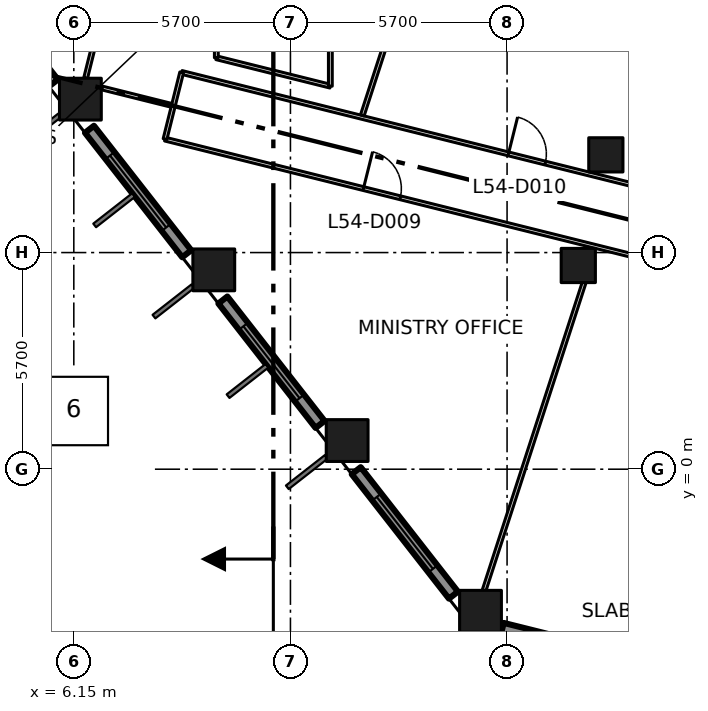
"""IFC4 building model, lengths in metres.
Left out: names, types, materials, properties, quantities, classifications, styles, units other than length and angle.
Written with IfcOpenShell. Run it as: python <this file> out.ifc"""

import sys

from ifc_helpers import new_model, si_unit, direction, frame, frame_2d, origin, origin_2d, place, context, subcontext, project, spatial, rectangle, extrude, element, fill, save


model = new_model("IFC4")
c1 = context("Model", 3, precision=1e-05, world=origin(), true_north=direction((0.0, 1.0)))
c2 = subcontext(c1, "Body", "Model", "MODEL_VIEW")
j1 = project(units=[si_unit("LENGTHUNIT", "METRE"), si_unit("PLANEANGLEUNIT", "RADIAN")], contexts=[c1])
p1 = place(None, origin())
s1 = spatial("IfcSite", under=j1, at=p1, CompositionType="ELEMENT")
p2 = place(p1, origin())
s2 = spatial("IfcBuilding", under=s1, at=p2, CompositionType="ELEMENT")
p3 = place(p2, frame((0.0, 0.0, 238.2)))
s3 = spatial("IfcBuildingStorey", under=s2, at=p3, CompositionType="ELEMENT", Elevation=238.2)
for number, where, z_axis, x_axis in (
    (1, (16.851, -3.738, 0.0), (0.0, 0.0, 1.0), (1.0, 0.0, 0.0)),
    (2, (13.342, 0.754, 0.0), (0.0, 0.0, 1.0), (1.0, 0.0, 0.0)),
    (3, (9.833, 5.245, 0.0), (0.0, 0.0, 1.0), (1.0, 0.0, 0.0)),
    (4, (6.323, 9.737, 0.0), (0.0, 0.0, 1.0), (1.0, 0.0, 0.0)),
):
    element("IfcColumn", number, at=place(p3, frame(where, z_axis=z_axis, x_axis=x_axis)), inside=s3, PredefinedType="COLUMN", context=c2, shape_type="SweptSolid", body=[
        extrude(rectangle(XDim=1.1, YDim=1.1, at=origin_2d()), origin(), (0.0, 0.0, 1.0), 4.2),
    ])
for number, where, z_axis, x_axis in (
    (5, (19.424, 5.36, 0.0), (0.0, 0.0, 1.0), (1.0, 0.0, 0.0)),
    (6, (20.149, 8.271, 0.0), (0.0, 0.0, 1.0), (1.0, 0.0, 0.0)),
):
    element("IfcColumn", number, at=place(p3, frame(where, z_axis=z_axis, x_axis=x_axis)), inside=s3, PredefinedType="COLUMN", context=c2, shape_type="SweptSolid", body=[
        extrude(rectangle(XDim=0.9, YDim=0.9, at=origin_2d()), origin(), (0.0, 0.0, 1.0), 4.2),
    ])
p4 = place(p3, frame((3.053, 13.436, 0.0), z_axis=(0.0, 0.0, 1.0), x_axis=(0.615699893917, -0.787980736205, 0.0)))
e7 = element("IfcWall", 7, at=p4, inside=s3, PredefinedType="SOLIDWALL", context=c2, shape_type="SweptSolid", body=[
    extrude(rectangle(XDim=4.156, YDim=0.3, at=frame_2d((2.078, 0.0))), origin(), (0.0, 0.0, 1.0), 3.15),
])
p5 = place(p4, frame((0.878, 0.0, 0.8)))
e8 = element("IfcOpeningElement", 8, at=p5, cuts=e7, PredefinedType="OPENING", context=c2, shape_type="SweptSolid", body=[
    extrude(rectangle(XDim=2.4, YDim=2.1, at=frame_2d((1.2, 1.05))), frame((0.0, 0.16, 0.0), z_axis=(0.0, -1.0, 0.0), x_axis=(1.0, 0.0, 0.0)), (0.0, 0.0, 1.0), 0.32),
])
p6 = place(p3, frame((6.562, 8.944, 0.0), z_axis=(0.0, 0.0, 1.0), x_axis=(0.615699893917, -0.787980736205, 0.0)))
e9 = element("IfcWall", 9, at=p6, inside=s3, PredefinedType="SOLIDWALL", context=c2, shape_type="SweptSolid", body=[
    extrude(rectangle(XDim=4.156, YDim=0.3, at=frame_2d((2.078, 0.0))), origin(), (0.0, 0.0, 1.0), 3.15),
])
p7 = place(p6, frame((0.878, 0.0, 0.8)))
e10 = element("IfcOpeningElement", 10, at=p7, cuts=e9, PredefinedType="OPENING", context=c2, shape_type="SweptSolid", body=[
    extrude(rectangle(XDim=2.4, YDim=2.1, at=frame_2d((1.2, 1.05))), frame((0.0, 0.16, 0.0), z_axis=(0.0, -1.0, 0.0), x_axis=(1.0, 0.0, 0.0)), (0.0, 0.0, 1.0), 0.32),
])
p8 = place(p3, frame((10.072, 4.452, 0.0), z_axis=(0.0, 0.0, 1.0), x_axis=(0.615660006568, -0.788011901124, 0.0)))
e11 = element("IfcWall", 11, at=p8, inside=s3, PredefinedType="SOLIDWALL", context=c2, shape_type="SweptSolid", body=[
    extrude(rectangle(XDim=4.155, YDim=0.3, at=frame_2d((2.077, 0.0))), origin(), (0.0, 0.0, 1.0), 3.15),
])
p9 = place(p8, frame((0.878, 0.0, 0.8)))
e12 = element("IfcOpeningElement", 12, at=p9, cuts=e11, PredefinedType="OPENING", context=c2, shape_type="SweptSolid", body=[
    extrude(rectangle(XDim=2.4, YDim=2.1, at=frame_2d((1.2, 1.05))), frame((0.0, 0.16, 0.0), z_axis=(0.0, -1.0, 0.0), x_axis=(1.0, 0.0, 0.0)), (0.0, 0.0, 1.0), 0.32),
])
p10 = place(p3, frame((13.581, -0.039, 0.0), z_axis=(0.0, 0.0, 1.0), x_axis=(0.615545986363, -0.788100969846, 0.0)))
e13 = element("IfcWall", 13, at=p10, inside=s3, PredefinedType="SOLIDWALL", context=c2, shape_type="SweptSolid", body=[
    extrude(rectangle(XDim=4.156, YDim=0.3, at=frame_2d((2.078, 0.0))), origin(), (0.0, 0.0, 1.0), 3.15),
])
p11 = place(p10, frame((0.878, 0.0, 0.8)))
e14 = element("IfcOpeningElement", 14, at=p11, cuts=e13, PredefinedType="OPENING", context=c2, shape_type="SweptSolid", body=[
    extrude(rectangle(XDim=2.4, YDim=2.1, at=frame_2d((1.2, 1.05))), frame((0.0, 0.16, 0.0), z_axis=(0.0, -1.0, 0.0), x_axis=(1.0, 0.0, 0.0)), (0.0, 0.0, 1.0), 0.32),
])
p12 = place(p3, frame((17.425, -4.19, 0.0), z_axis=(0.0, 0.0, 1.0), x_axis=(0.970270592847, -0.242022677978, 0.0)))
e15 = element("IfcWall", 15, at=p12, inside=s3, PredefinedType="SOLIDWALL", context=c2, shape_type="SweptSolid", body=[
    extrude(rectangle(XDim=4.368, YDim=0.3, at=frame_2d((2.184, 0.0))), origin(), (0.0, 0.0, 1.0), 3.15),
])
p13 = place(p12, frame((0.983, 0.0, 0.8)))
e16 = element("IfcOpeningElement", 16, at=p13, cuts=e15, PredefinedType="OPENING", context=c2, shape_type="SweptSolid", body=[
    extrude(rectangle(XDim=2.4, YDim=2.1, at=frame_2d((1.2, 1.05))), frame((0.0, 0.16, 0.0), z_axis=(0.0, -1.0, 0.0), x_axis=(1.0, 0.0, 0.0)), (0.0, 0.0, 1.0), 0.32),
])
p14 = place(p3, frame((8.55, 8.685, 0.0), z_axis=(0.0, 0.0, 1.0), x_axis=(0.970297603286, -0.241914367199, 0.0)))
e17 = element("IfcWall", 17, at=p14, inside=s3, PredefinedType="PARTITIONING", context=c2, shape_type="SweptSolid", body=[
    extrude(rectangle(XDim=50.675, YDim=0.1, at=frame_2d((25.337, 0.0))), origin(), (0.0, 0.0, 1.0), 3.9),
])
p15 = place(p14, frame((35.657, 0.0, 0.0)))
e18 = element("IfcOpeningElement", 18, at=p15, cuts=e17, PredefinedType="OPENING", context=c2, shape_type="SweptSolid", body=[
    extrude(rectangle(XDim=1.8, YDim=2.1, at=frame_2d((0.9, 1.05))), frame((0.0, 0.06, 0.0), z_axis=(0.0, -1.0, 0.0), x_axis=(1.0, 0.0, 0.0)), (0.0, 0.0, 1.0), 0.12),
])
p16 = place(p14, frame((14.657, 0.0, 0.0)))
e19 = element("IfcOpeningElement", 19, at=p16, cuts=e17, PredefinedType="OPENING", context=c2, shape_type="SweptSolid", body=[
    extrude(rectangle(XDim=1.0, YDim=2.1, at=frame_2d((0.5, 1.05))), frame((0.0, 0.06, 0.0), z_axis=(0.0, -1.0, 0.0), x_axis=(1.0, 0.0, 0.0)), (0.0, 0.0, 1.0), 0.12),
])
p17 = place(p14, frame((19.357, 0.0, 0.0)))
e20 = element("IfcOpeningElement", 20, at=p17, cuts=e17, PredefinedType="OPENING", context=c2, shape_type="SweptSolid", body=[
    extrude(rectangle(XDim=1.8, YDim=2.1, at=frame_2d((0.9, 1.05))), frame((0.0, 0.06, 0.0), z_axis=(0.0, -1.0, 0.0), x_axis=(1.0, 0.0, 0.0)), (0.0, 0.0, 1.0), 0.12),
])
p18 = place(p14, frame((5.38, 0.0, 0.0)))
e21 = element("IfcOpeningElement", 21, at=p18, cuts=e17, PredefinedType="OPENING", context=c2, shape_type="SweptSolid", body=[
    extrude(rectangle(XDim=1.0, YDim=2.1, at=frame_2d((0.5, 1.05))), frame((0.0, 0.06, 0.0), z_axis=(0.0, -1.0, 0.0), x_axis=(1.0, 0.0, 0.0)), (0.0, 0.0, 1.0), 0.12),
])
p19 = place(p3, frame((8.988, 10.44, 0.0), z_axis=(0.0, 0.0, 1.0), x_axis=(0.970301223092, -0.241899848006, 0.0)))
e22 = element("IfcWall", 22, at=p19, inside=s3, PredefinedType="PARTITIONING", context=c2, shape_type="SweptSolid", body=[
    extrude(rectangle(XDim=19.879, YDim=0.1, at=frame_2d((9.94, 0.0))), origin(), (0.0, 0.0, 1.0), 3.9),
])
p20 = place(p19, frame((8.861, 0.0, 0.0)))
e23 = element("IfcOpeningElement", 23, at=p20, cuts=e22, PredefinedType="OPENING", context=c2, shape_type="SweptSolid", body=[
    extrude(rectangle(XDim=1.0, YDim=2.1, at=frame_2d((0.5, 1.05))), frame((0.0, 0.06, 0.0), z_axis=(0.0, -1.0, 0.0), x_axis=(1.0, 0.0, 0.0)), (0.0, 0.0, 1.0), 0.12),
])
p21 = place(p3, frame((8.988, 10.44, 0.0), z_axis=(0.0, 0.0, 1.0), x_axis=(-0.242154485745, -0.970237705428, 0.0)))
e24 = element("IfcWall", 24, at=p21, inside=s3, PredefinedType="PARTITIONING", context=c2, shape_type="SweptSolid", body=[
    extrude(rectangle(XDim=1.809, YDim=0.1, at=frame_2d((0.904, 0.0))), origin(), (0.0, 0.0, 1.0), 3.9),
])
p22 = place(p3, frame((9.9, 10.826, 0.0), z_axis=(0.0, 0.0, 1.0), x_axis=(0.970290953223, -0.241941038466, 0.0)))
e25 = element("IfcWall", 25, at=p22, inside=s3, PredefinedType="PARTITIONING", context=c2, shape_type="SweptSolid", body=[
    extrude(rectangle(XDim=3.092, YDim=0.1, at=frame_2d((1.546, 0.0))), origin(), (0.0, 0.0, 1.0), 3.9),
])
p23 = place(p3, frame((9.9, 12.2, 0.0), z_axis=(0.0, 0.0, 1.0), x_axis=(0.0, -1.0, 0.0)))
e26 = element("IfcWall", 26, at=p23, inside=s3, PredefinedType="PARTITIONING", context=c2, shape_type="SweptSolid", body=[
    extrude(rectangle(XDim=1.374, YDim=0.1, at=frame_2d((0.687, 0.0))), origin(), (0.0, 0.0, 1.0), 3.9),
])
p24 = place(p3, frame((12.9, 10.078, 0.0), z_axis=(0.0, 0.0, 1.0), x_axis=(0.0, 1.0, 0.0)))
e27 = element("IfcWall", 27, at=p24, inside=s3, PredefinedType="PARTITIONING", context=c2, shape_type="SweptSolid", body=[
    extrude(rectangle(XDim=4.022, YDim=0.1, at=frame_2d((2.011, 0.0))), origin(), (0.0, 0.0, 1.0), 3.9),
])
p25 = place(p3, frame((6.922, 12.138, 0.0), z_axis=(0.0, 0.0, 1.0), x_axis=(-0.242264600824, -0.970210215978, 0.0)))
e28 = element("IfcWall", 28, at=p25, inside=s3, PredefinedType="PARTITIONING", context=c2, shape_type="SweptSolid", body=[
    extrude(rectangle(XDim=1.908, YDim=0.1, at=frame_2d((0.954, 0.0))), origin(), (0.0, 0.0, 1.0), 3.9),
])
p26 = place(p3, frame((8.72, 9.574, 0.0), z_axis=(0.0, 0.0, 1.0), x_axis=(-0.970240497311, 0.242143299263, 0.0)))
e29 = element("IfcWall", 29, at=p26, inside=s3, PredefinedType="PARTITIONING", context=c2, shape_type="SweptSolid", body=[
    extrude(rectangle(XDim=1.904, YDim=0.1, at=frame_2d((0.952, 0.0))), origin(), (0.0, 0.0, 1.0), 3.9),
])
p27 = place(p3, frame((13.741, 9.31, 0.0), z_axis=(0.0, 0.0, 1.0), x_axis=(0.308976461467, 0.95106968528, 0.0)))
e30 = element("IfcWall", 30, at=p27, inside=s3, PredefinedType="PARTITIONING", context=c2, shape_type="SweptSolid", body=[
    extrude(rectangle(XDim=5.036, YDim=0.1, at=frame_2d((2.518, 0.0))), origin(), (0.0, 0.0, 1.0), 3.9),
])
p28 = place(p3, frame((16.946, -3.188, 0.0), z_axis=(0.0, 0.0, 1.0), x_axis=(0.308984279279, 0.951067145452, 0.0)))
e31 = element("IfcWall", 31, at=p28, inside=s3, PredefinedType="PARTITIONING", context=c2, shape_type="SweptSolid", body=[
    extrude(rectangle(XDim=8.515, YDim=0.1, at=frame_2d((4.257, 0.0))), origin(), (0.0, 0.0, 1.0), 3.9),
])
p29 = place(p7, origin())
e32 = element("IfcWindow", 32, at=p29, inside=s3, PartitioningType="DOUBLE_PANEL_VERTICAL", PredefinedType="WINDOW", context=c2, shape_type="SweptSolid", body=[
    extrude(rectangle(XDim=2.4, YDim=2.1, at=frame_2d((1.2, 1.05))), frame((0.0, 0.03, 0.0), z_axis=(0.0, -1.0, 0.0), x_axis=(1.0, 0.0, 0.0)), (0.0, 0.0, 1.0), 0.06),
])
fill(e10, e32)
p30 = place(p9, origin())
e33 = element("IfcWindow", 33, at=p30, inside=s3, PartitioningType="DOUBLE_PANEL_VERTICAL", PredefinedType="WINDOW", context=c2, shape_type="SweptSolid", body=[
    extrude(rectangle(XDim=2.4, YDim=2.1, at=frame_2d((1.2, 1.05))), frame((0.0, 0.03, 0.0), z_axis=(0.0, -1.0, 0.0), x_axis=(1.0, 0.0, 0.0)), (0.0, 0.0, 1.0), 0.06),
])
fill(e12, e33)
p31 = place(p11, origin())
e34 = element("IfcWindow", 34, at=p31, inside=s3, PartitioningType="DOUBLE_PANEL_VERTICAL", PredefinedType="WINDOW", context=c2, shape_type="SweptSolid", body=[
    extrude(rectangle(XDim=2.4, YDim=2.1, at=frame_2d((1.2, 1.05))), frame((0.0, 0.03, 0.0), z_axis=(0.0, -1.0, 0.0), x_axis=(1.0, 0.0, 0.0)), (0.0, 0.0, 1.0), 0.06),
])
fill(e14, e34)
p32 = place(p18, origin())
e35 = element("IfcDoor", 35, at=p32, inside=s3, OperationType="SINGLE_SWING_LEFT", PredefinedType="DOOR", context=c2, shape_type="SweptSolid", body=[
    extrude(rectangle(XDim=1.0, YDim=2.1, at=frame_2d((0.5, 1.05))), frame((0.0, 0.025, 0.0), z_axis=(0.0, -1.0, 0.0), x_axis=(1.0, 0.0, 0.0)), (0.0, 0.0, 1.0), 0.05),
])
fill(e21, e35)
p33 = place(p20, origin())
e36 = element("IfcDoor", 36, at=p33, inside=s3, OperationType="SINGLE_SWING_LEFT", PredefinedType="DOOR", context=c2, shape_type="SweptSolid", body=[
    extrude(rectangle(XDim=1.0, YDim=2.1, at=frame_2d((0.5, 1.05))), frame((0.0, 0.025, 0.0), z_axis=(0.0, -1.0, 0.0), x_axis=(1.0, 0.0, 0.0)), (0.0, 0.0, 1.0), 0.05),
])
fill(e23, e36)
save(model, sys.argv[1])
